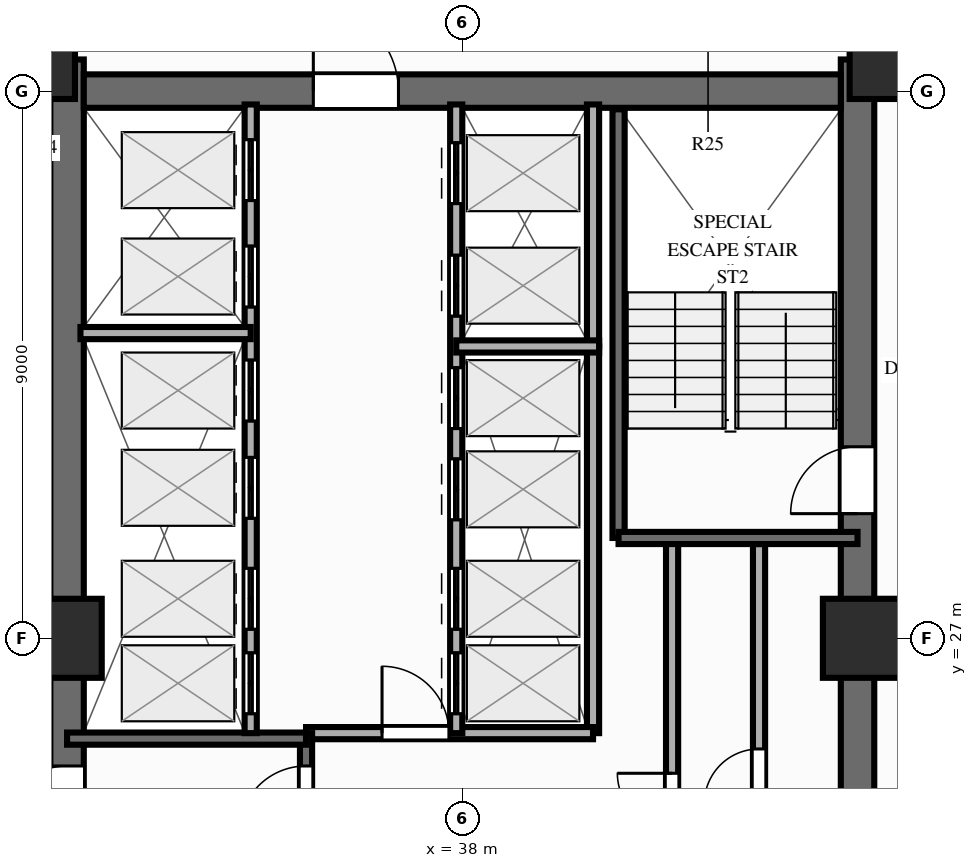
"""IFC4 building model, lengths in metres.
Left out: names, types, materials, properties, quantities, classifications, styles, units other than length and angle.
Written with IfcOpenShell. Run it as: python <this file> out.ifc"""

import sys

from ifc_helpers import new_model, si_unit, direction, frame, frame_2d, origin, origin_2d, place, context, subcontext, project, spatial, rectangle, extrude, source, transform, mapped, element, fill, save


model = new_model("IFC4")
c1 = context("Model", 3, precision=1e-05, world=origin(), true_north=direction((0.0, 1.0)))
c2 = subcontext(c1, "Body", "Model", "MODEL_VIEW")
j1 = project(units=[si_unit("LENGTHUNIT", "METRE"), si_unit("PLANEANGLEUNIT", "RADIAN")], contexts=[c1])
p1 = place(None, origin())
s1 = spatial("IfcSite", under=j1, at=p1, CompositionType="ELEMENT")
p2 = place(p1, origin())
s2 = spatial("IfcBuilding", under=s1, at=p2, CompositionType="ELEMENT")
p3 = place(p2, frame((0.0, 0.0, 89.85)))
s3 = spatial("IfcBuildingStorey", under=s2, at=p3, CompositionType="ELEMENT", Elevation=89.85)
p4 = place(p3, frame((31.5, 17.48, 0.0), z_axis=(0.0, 0.0, 1.0), x_axis=(0.0, 1.0, 0.0)))
e1 = element("IfcWall", 1, at=p4, inside=s3, PredefinedType="SHEAR", context=c2, shape_type="SweptSolid", body=[
    extrude(rectangle(XDim=19.04, YDim=0.55, at=frame_2d((9.52, 0.0))), origin(), (0.0, 0.0, 1.0), 3.0),
])
p5 = place(p4, frame((6.32, 0.0, 0.0)))
e2 = element("IfcOpeningElement", 2, at=p5, cuts=e1, PredefinedType="OPENING", context=c2, shape_type="SweptSolid", body=[
    extrude(rectangle(XDim=1.1, YDim=2.15, at=frame_2d((0.55, 1.075))), frame((0.0, 0.287, 0.0), z_axis=(0.0, -1.0, 0.0), x_axis=(1.0, 0.0, 0.0)), (0.0, 0.0, 1.0), 0.574),
])
p6 = place(p3, frame((44.5, 17.48, 0.0), z_axis=(0.0, 0.0, 1.0), x_axis=(0.0, 1.0, 0.0)))
e3 = element("IfcWall", 3, at=p6, inside=s3, PredefinedType="SHEAR", context=c2, shape_type="SweptSolid", body=[
    extrude(rectangle(XDim=19.04, YDim=0.55, at=frame_2d((9.52, 0.0))), origin(), (0.0, 0.0, 1.0), 3.0),
])
p7 = place(p6, frame((12.67, 0.0, 0.0), z_axis=(0.0, 0.0, 1.0), x_axis=(-1.0, 0.0, 0.0)))
e4 = element("IfcOpeningElement", 4, at=p7, cuts=e3, PredefinedType="OPENING", context=c2, shape_type="SweptSolid", body=[
    extrude(rectangle(XDim=1.1, YDim=2.15, at=frame_2d((0.55, 1.075))), frame((0.0, 0.287, 0.0), z_axis=(0.0, -1.0, 0.0), x_axis=(1.0, 0.0, 0.0)), (0.0, 0.0, 1.0), 0.574),
])
p8 = place(p3, frame((31.775, 36.0, 0.0), z_axis=(0.0, 0.0, 1.0), x_axis=(1.0, 0.0, 0.0)))
e5 = element("IfcWall", 5, at=p8, inside=s3, PredefinedType="SHEAR", context=c2, shape_type="SweptSolid", body=[
    extrude(rectangle(XDim=12.45, YDim=0.55, at=frame_2d((6.225, 0.0))), origin(), (0.0, 0.0, 1.0), 3.0),
])
p9 = place(p8, frame((5.175, 0.0, 0.0), z_axis=(0.0, 0.0, 1.0), x_axis=(-1.0, 0.0, 0.0)))
e6 = element("IfcOpeningElement", 6, at=p9, cuts=e5, PredefinedType="OPENING", context=c2, shape_type="SweptSolid", body=[
    extrude(rectangle(XDim=1.4, YDim=2.15, at=frame_2d((0.7, 1.075))), frame((0.0, 0.287, 0.0), z_axis=(0.0, -1.0, 0.0), x_axis=(1.0, 0.0, 0.0)), (0.0, 0.0, 1.0), 0.574),
])
m1 = source(origin(), c2, "Body", "SweptSolid", [
    extrude(rectangle(XDim=1.3, YDim=1.3, at=origin_2d()), origin(), (0.0, 0.0, 1.0), 3.0),
])
for number, where, z_axis, x_axis in (
    (7, (30.98, 36.52, 0.0), (0.0, 0.0, 1.0), (1.0, 0.0, 0.0)),
    (8, (45.02, 36.52, 0.0), (0.0, 0.0, 1.0), (1.0, 0.0, 0.0)),
    (9, (31.42, 27.0, 0.0), (0.0, 0.0, 1.0), (1.0, 0.0, 0.0)),
    (10, (44.58, 27.0, 0.0), (0.0, 0.0, 1.0), (1.0, 0.0, 0.0)),
):
    element("IfcColumn", number, at=place(p3, frame(where, z_axis=z_axis, x_axis=x_axis)), inside=s3, PredefinedType="COLUMN", context=c2, shape_type="MappedRepresentation", body=[
        mapped(m1, transform((0.0, 0.0, 0.0), scale=1.0)),
    ])
p10 = place(p3, frame((42.88, 21.08, 0.0), z_axis=(0.0, 0.0, 1.0), x_axis=(0.0, 1.0, 0.0)))
e11 = element("IfcWall", 11, at=p10, inside=s3, PredefinedType="PARTITIONING", context=c2, shape_type="SweptSolid", body=[
    extrude(rectangle(XDim=7.47, YDim=0.2, at=frame_2d((3.735, 0.0))), origin(), (0.0, 0.0, 1.0), 2.79),
])
p11 = place(p10, frame((3.2, 0.0, 0.0)))
e12 = element("IfcOpeningElement", 12, at=p11, cuts=e11, PredefinedType="OPENING", context=c2, shape_type="SweptSolid", body=[
    extrude(rectangle(XDim=0.9, YDim=2.1, at=frame_2d((0.45, 1.05))), frame((0.0, 0.112, 0.0), z_axis=(0.0, -1.0, 0.0), x_axis=(1.0, 0.0, 0.0)), (0.0, 0.0, 1.0), 0.224),
])
p12 = place(p3, frame((41.45, 21.08, 0.0), z_axis=(0.0, 0.0, 1.0), x_axis=(0.0, 1.0, 0.0)))
e13 = element("IfcWall", 13, at=p12, inside=s3, PredefinedType="PARTITIONING", context=c2, shape_type="SweptSolid", body=[
    extrude(rectangle(XDim=7.52, YDim=0.2, at=frame_2d((3.76, 0.0))), origin(), (0.0, 0.0, 1.0), 2.79),
])
p13 = place(p12, frame((2.8, 0.0, 0.0)))
e14 = element("IfcOpeningElement", 14, at=p13, cuts=e13, PredefinedType="OPENING", context=c2, shape_type="SweptSolid", body=[
    extrude(rectangle(XDim=0.9, YDim=2.1, at=frame_2d((0.45, 1.05))), frame((0.0, 0.112, 0.0), z_axis=(0.0, -1.0, 0.0), x_axis=(1.0, 0.0, 0.0)), (0.0, 0.0, 1.0), 0.224),
])
p14 = place(p3, frame((40.15, 25.44, 0.0), z_axis=(0.0, 0.0, 1.0), x_axis=(0.0, 1.0, 0.0)))
e15 = element("IfcWall", 15, at=p14, inside=s3, PredefinedType="PARTITIONING", context=c2, shape_type="SweptSolid", body=[
    extrude(rectangle(XDim=6.36, YDim=0.2, at=frame_2d((3.18, 0.0))), origin(), (0.0, 0.0, 1.0), 2.79),
])
p15 = place(p3, frame((40.15, 31.8, 0.0), z_axis=(0.0, 0.0, 1.0), x_axis=(0.0, 1.0, 0.0)))
e16 = element("IfcWall", 16, at=p15, inside=s3, PredefinedType="PARTITIONING", context=c2, shape_type="SweptSolid", body=[
    extrude(rectangle(XDim=3.98, YDim=0.2, at=frame_2d((1.99, 0.0))), origin(), (0.0, 0.0, 1.0), 2.79),
])
p16 = place(p3, frame((35.43, 25.44, 0.0), z_axis=(0.0, 0.0, 1.0), x_axis=(1.0, 0.0, 0.0)))
e17 = element("IfcWall", 17, at=p16, inside=s3, PredefinedType="PARTITIONING", context=c2, shape_type="SweptSolid", body=[
    extrude(rectangle(XDim=4.72, YDim=0.2, at=frame_2d((2.36, 0.0))), origin(), (0.0, 0.0, 1.0), 2.79),
])
p17 = place(p16, frame((1.25, 0.0, 0.0)))
e18 = element("IfcOpeningElement", 18, at=p17, cuts=e17, PredefinedType="OPENING", context=c2, shape_type="SweptSolid", body=[
    extrude(rectangle(XDim=1.1, YDim=2.15, at=frame_2d((0.55, 1.075))), frame((0.0, 0.112, 0.0), z_axis=(0.0, -1.0, 0.0), x_axis=(1.0, 0.0, 0.0)), (0.0, 0.0, 1.0), 0.224),
])
p18 = place(p3, frame((35.43, 18.22, 0.0), z_axis=(0.0, 0.0, 1.0), x_axis=(0.0, 1.0, 0.0)))
e19 = element("IfcWall", 19, at=p18, inside=s3, PredefinedType="SOLIDWALL", context=c2, shape_type="SweptSolid", body=[
    extrude(rectangle(XDim=7.22, YDim=0.2, at=frame_2d((3.61, 0.0))), origin(), (0.0, 0.0, 1.0), 2.79),
])
p19 = place(p18, frame((6.68, 0.0, 0.0), z_axis=(0.0, 0.0, 1.0), x_axis=(-1.0, 0.0, 0.0)))
e20 = element("IfcOpeningElement", 20, at=p19, cuts=e19, PredefinedType="OPENING", context=c2, shape_type="SweptSolid", body=[
    extrude(rectangle(XDim=1.1, YDim=2.15, at=frame_2d((0.55, 1.075))), frame((0.0, 0.112, 0.0), z_axis=(0.0, -1.0, 0.0), x_axis=(1.0, 0.0, 0.0)), (0.0, 0.0, 1.0), 0.224),
])
p20 = place(p3, frame((31.5, 25.35, 0.0), z_axis=(0.0, 0.0, 1.0), x_axis=(1.0, 0.0, 0.0)))
e21 = element("IfcWall", 21, at=p20, inside=s3, PredefinedType="SOLIDWALL", context=c2, shape_type="SweptSolid", body=[
    extrude(rectangle(XDim=3.93, YDim=0.2, at=frame_2d((1.965, 0.0))), origin(), (0.0, 0.0, 1.0), 2.79),
])
p21 = place(p3, frame((40.57, 28.65, 0.0), z_axis=(0.0, 0.0, 1.0), x_axis=(0.0, 1.0, 0.0)))
e22 = element("IfcWall", 22, at=p21, inside=s3, PredefinedType="SOLIDWALL", context=c2, shape_type="SweptSolid", body=[
    extrude(rectangle(XDim=7.05, YDim=0.2, at=frame_2d((3.525, 0.0))), origin(), (0.0, 0.0, 1.0), 2.79),
])
p22 = place(p3, frame((40.57, 28.65, 0.0), z_axis=(0.0, 0.0, 1.0), x_axis=(1.0, 0.0, 0.0)))
e23 = element("IfcWall", 23, at=p22, inside=s3, PredefinedType="SOLIDWALL", context=c2, shape_type="SweptSolid", body=[
    extrude(rectangle(XDim=3.93, YDim=0.2, at=frame_2d((1.965, 0.0))), origin(), (0.0, 0.0, 1.0), 2.79),
])
p23 = place(p3, frame((34.52, 25.44, 0.0), z_axis=(0.0, 0.0, 1.0), x_axis=(0.0, 1.0, 0.0)))
e24 = element("IfcWall", 24, at=p23, inside=s3, PredefinedType="PARTITIONING", context=c2, shape_type="SweptSolid", body=[
    extrude(rectangle(XDim=10.34, YDim=0.2, at=frame_2d((5.17, 0.0))), origin(), (0.0, 0.0, 1.0), 2.79),
])
p24 = place(p23, frame((0.32, 0.0, 0.0)))
e25 = element("IfcOpeningElement", 25, at=p24, cuts=e24, PredefinedType="OPENING", context=c2, shape_type="SweptSolid", body=[
    extrude(rectangle(XDim=1.0, YDim=2.15, at=frame_2d((0.5, 1.075))), frame((0.0, 0.112, 0.0), z_axis=(0.0, -1.0, 0.0), x_axis=(1.0, 0.0, 0.0)), (0.0, 0.0, 1.0), 0.224),
])
p25 = place(p23, frame((1.71, 0.0, 0.0)))
e26 = element("IfcOpeningElement", 26, at=p25, cuts=e24, PredefinedType="OPENING", context=c2, shape_type="SweptSolid", body=[
    extrude(rectangle(XDim=1.0, YDim=2.15, at=frame_2d((0.5, 1.075))), frame((0.0, 0.112, 0.0), z_axis=(0.0, -1.0, 0.0), x_axis=(1.0, 0.0, 0.0)), (0.0, 0.0, 1.0), 0.224),
])
p26 = place(p23, frame((3.535, 0.0, 0.0)))
e27 = element("IfcOpeningElement", 27, at=p26, cuts=e24, PredefinedType="OPENING", context=c2, shape_type="SweptSolid", body=[
    extrude(rectangle(XDim=1.0, YDim=2.15, at=frame_2d((0.5, 1.075))), frame((0.0, 0.112, 0.0), z_axis=(0.0, -1.0, 0.0), x_axis=(1.0, 0.0, 0.0)), (0.0, 0.0, 1.0), 0.224),
])
p27 = place(p23, frame((5.135, 0.0, 0.0)))
e28 = element("IfcOpeningElement", 28, at=p27, cuts=e24, PredefinedType="OPENING", context=c2, shape_type="SweptSolid", body=[
    extrude(rectangle(XDim=1.0, YDim=2.15, at=frame_2d((0.5, 1.075))), frame((0.0, 0.112, 0.0), z_axis=(0.0, -1.0, 0.0), x_axis=(1.0, 0.0, 0.0)), (0.0, 0.0, 1.0), 0.224),
])
p28 = place(p23, frame((7.01, 0.0, 0.0)))
e29 = element("IfcOpeningElement", 29, at=p28, cuts=e24, PredefinedType="OPENING", context=c2, shape_type="SweptSolid", body=[
    extrude(rectangle(XDim=1.0, YDim=2.15, at=frame_2d((0.5, 1.075))), frame((0.0, 0.112, 0.0), z_axis=(0.0, -1.0, 0.0), x_axis=(1.0, 0.0, 0.0)), (0.0, 0.0, 1.0), 0.224),
])
p29 = place(p23, frame((8.76, 0.0, 0.0)))
e30 = element("IfcOpeningElement", 30, at=p29, cuts=e24, PredefinedType="OPENING", context=c2, shape_type="SweptSolid", body=[
    extrude(rectangle(XDim=1.0, YDim=2.15, at=frame_2d((0.5, 1.075))), frame((0.0, 0.112, 0.0), z_axis=(0.0, -1.0, 0.0), x_axis=(1.0, 0.0, 0.0)), (0.0, 0.0, 1.0), 0.224),
])
p30 = place(p3, frame((31.72, 32.02, 0.0), z_axis=(0.0, 0.0, 1.0), x_axis=(1.0, 0.0, 0.0)))
e31 = element("IfcWall", 31, at=p30, inside=s3, PredefinedType="PARTITIONING", context=c2, shape_type="SweptSolid", body=[
    extrude(rectangle(XDim=2.8, YDim=0.2, at=frame_2d((1.4, 0.0))), origin(), (0.0, 0.0, 1.0), 2.79),
])
p31 = place(p3, frame((37.9, 25.44, 0.0), z_axis=(0.0, 0.0, 1.0), x_axis=(0.0, 1.0, 0.0)))
e32 = element("IfcWall", 32, at=p31, inside=s3, PredefinedType="PARTITIONING", context=c2, shape_type="SweptSolid", body=[
    extrude(rectangle(XDim=10.34, YDim=0.2, at=frame_2d((5.17, 0.0))), origin(), (0.0, 0.0, 1.0), 2.79),
])
p32 = place(p31, frame((0.32, 0.0, 0.0)))
e33 = element("IfcOpeningElement", 33, at=p32, cuts=e32, PredefinedType="OPENING", context=c2, shape_type="SweptSolid", body=[
    extrude(rectangle(XDim=1.0, YDim=2.15, at=frame_2d((0.5, 1.075))), frame((0.0, 0.112, 0.0), z_axis=(0.0, -1.0, 0.0), x_axis=(1.0, 0.0, 0.0)), (0.0, 0.0, 1.0), 0.224),
])
p33 = place(p31, frame((1.71, 0.0, 0.0)))
e34 = element("IfcOpeningElement", 34, at=p33, cuts=e32, PredefinedType="OPENING", context=c2, shape_type="SweptSolid", body=[
    extrude(rectangle(XDim=1.0, YDim=2.15, at=frame_2d((0.5, 1.075))), frame((0.0, 0.112, 0.0), z_axis=(0.0, -1.0, 0.0), x_axis=(1.0, 0.0, 0.0)), (0.0, 0.0, 1.0), 0.224),
])
p34 = place(p31, frame((3.51, 0.0, 0.0)))
e35 = element("IfcOpeningElement", 35, at=p34, cuts=e32, PredefinedType="OPENING", context=c2, shape_type="SweptSolid", body=[
    extrude(rectangle(XDim=1.0, YDim=2.15, at=frame_2d((0.5, 1.075))), frame((0.0, 0.112, 0.0), z_axis=(0.0, -1.0, 0.0), x_axis=(1.0, 0.0, 0.0)), (0.0, 0.0, 1.0), 0.224),
])
p35 = place(p31, frame((5.01, 0.0, 0.0)))
e36 = element("IfcOpeningElement", 36, at=p35, cuts=e32, PredefinedType="OPENING", context=c2, shape_type="SweptSolid", body=[
    extrude(rectangle(XDim=1.0, YDim=2.15, at=frame_2d((0.5, 1.075))), frame((0.0, 0.112, 0.0), z_axis=(0.0, -1.0, 0.0), x_axis=(1.0, 0.0, 0.0)), (0.0, 0.0, 1.0), 0.224),
])
p36 = place(p31, frame((6.86, 0.0, 0.0)))
e37 = element("IfcOpeningElement", 37, at=p36, cuts=e32, PredefinedType="OPENING", context=c2, shape_type="SweptSolid", body=[
    extrude(rectangle(XDim=1.0, YDim=2.15, at=frame_2d((0.5, 1.075))), frame((0.0, 0.112, 0.0), z_axis=(0.0, -1.0, 0.0), x_axis=(1.0, 0.0, 0.0)), (0.0, 0.0, 1.0), 0.224),
])
p37 = place(p31, frame((8.71, 0.0, 0.0)))
e38 = element("IfcOpeningElement", 38, at=p37, cuts=e32, PredefinedType="OPENING", context=c2, shape_type="SweptSolid", body=[
    extrude(rectangle(XDim=1.0, YDim=2.15, at=frame_2d((0.5, 1.075))), frame((0.0, 0.112, 0.0), z_axis=(0.0, -1.0, 0.0), x_axis=(1.0, 0.0, 0.0)), (0.0, 0.0, 1.0), 0.224),
])
p38 = place(p3, frame((37.9, 31.8, 0.0), z_axis=(0.0, 0.0, 1.0), x_axis=(1.0, 0.0, 0.0)))
e39 = element("IfcWall", 39, at=p38, inside=s3, PredefinedType="PARTITIONING", context=c2, shape_type="SweptSolid", body=[
    extrude(rectangle(XDim=2.35, YDim=0.2, at=frame_2d((1.175, 0.0))), origin(), (0.0, 0.0, 1.0), 2.79),
])
m2 = source(origin(), c2, "Body", "SweptSolid", [
    extrude(rectangle(XDim=1.1, YDim=2.15, at=frame_2d((0.55, 1.075))), frame((0.0, 0.025, 0.0), z_axis=(0.0, -1.0, 0.0), x_axis=(1.0, 0.0, 0.0)), (0.0, 0.0, 1.0), 0.05),
])
p39 = place(p5, origin())
e40 = element("IfcDoor", 40, at=p39, inside=s3, OperationType="SINGLE_SWING_LEFT", PredefinedType="DOOR", context=c2, shape_type="MappedRepresentation", body=[
    mapped(m2, transform((0.0, 0.0, 0.0), scale=1.0)),
])
fill(e2, e40)
p40 = place(p7, origin())
e41 = element("IfcDoor", 41, at=p40, inside=s3, OperationType="SINGLE_SWING_RIGHT", PredefinedType="DOOR", context=c2, shape_type="MappedRepresentation", body=[
    mapped(m2, transform((0.0, 0.0, 0.0), scale=1.0)),
])
fill(e4, e41)
m3 = source(origin(), c2, "Body", "SweptSolid", [
    extrude(rectangle(XDim=1.4, YDim=2.15, at=frame_2d((0.7, 1.075))), frame((0.0, 0.025, 0.0), z_axis=(0.0, -1.0, 0.0), x_axis=(1.0, 0.0, 0.0)), (0.0, 0.0, 1.0), 0.05),
])
p41 = place(p9, origin())
e42 = element("IfcDoor", 42, at=p41, inside=s3, OperationType="SINGLE_SWING_RIGHT", PredefinedType="DOOR", context=c2, shape_type="MappedRepresentation", body=[
    mapped(m3, transform((0.0, 0.0, 0.0), scale=1.0)),
])
fill(e6, e42)
m4 = source(origin(), c2, "Body", "SweptSolid", [
    extrude(rectangle(XDim=0.9, YDim=2.1, at=frame_2d((0.45, 1.05))), frame((0.0, 0.025, 0.0), z_axis=(0.0, -1.0, 0.0), x_axis=(1.0, 0.0, 0.0)), (0.0, 0.0, 1.0), 0.05),
])
p42 = place(p11, origin())
e43 = element("IfcDoor", 43, at=p42, inside=s3, OperationType="SINGLE_SWING_LEFT", PredefinedType="DOOR", context=c2, shape_type="MappedRepresentation", body=[
    mapped(m4, transform((0.0, 0.0, 0.0), scale=1.0)),
])
fill(e12, e43)
p43 = place(p13, origin())
e44 = element("IfcDoor", 44, at=p43, inside=s3, OperationType="SINGLE_SWING_RIGHT", PredefinedType="DOOR", context=c2, shape_type="MappedRepresentation", body=[
    mapped(m4, transform((0.0, 0.0, 0.0), scale=1.0)),
])
fill(e14, e44)
p44 = place(p17, origin())
e45 = element("IfcDoor", 45, at=p44, inside=s3, OperationType="SINGLE_SWING_LEFT", PredefinedType="DOOR", context=c2, shape_type="MappedRepresentation", body=[
    mapped(m2, transform((0.0, 0.0, 0.0), scale=1.0)),
])
fill(e18, e45)
p45 = place(p19, origin())
e46 = element("IfcDoor", 46, at=p45, inside=s3, OperationType="SINGLE_SWING_RIGHT", PredefinedType="DOOR", context=c2, shape_type="MappedRepresentation", body=[
    mapped(m2, transform((0.0, 0.0, 0.0), scale=1.0)),
])
fill(e20, e46)
m5 = source(origin(), c2, "Body", "SweptSolid", [
    extrude(rectangle(XDim=1.0, YDim=2.15, at=frame_2d((0.5, 1.075))), frame((0.0, 0.025, 0.0), z_axis=(0.0, -1.0, 0.0), x_axis=(1.0, 0.0, 0.0)), (0.0, 0.0, 1.0), 0.05),
])
p46 = place(p24, origin())
e47 = element("IfcDoor", 47, at=p46, inside=s3, OperationType="DOUBLE_DOOR_SLIDING", PredefinedType="DOOR", context=c2, shape_type="MappedRepresentation", body=[
    mapped(m5, transform((0.0, 0.0, 0.0), scale=1.0)),
])
fill(e25, e47)
p47 = place(p25, origin())
e48 = element("IfcDoor", 48, at=p47, inside=s3, OperationType="DOUBLE_DOOR_SLIDING", PredefinedType="DOOR", context=c2, shape_type="MappedRepresentation", body=[
    mapped(m5, transform((0.0, 0.0, 0.0), scale=1.0)),
])
fill(e26, e48)
p48 = place(p26, origin())
e49 = element("IfcDoor", 49, at=p48, inside=s3, OperationType="DOUBLE_DOOR_SLIDING", PredefinedType="DOOR", context=c2, shape_type="MappedRepresentation", body=[
    mapped(m5, transform((0.0, 0.0, 0.0), scale=1.0)),
])
fill(e27, e49)
p49 = place(p27, origin())
e50 = element("IfcDoor", 50, at=p49, inside=s3, OperationType="DOUBLE_DOOR_SLIDING", PredefinedType="DOOR", context=c2, shape_type="MappedRepresentation", body=[
    mapped(m5, transform((0.0, 0.0, 0.0), scale=1.0)),
])
fill(e28, e50)
p50 = place(p28, origin())
e51 = element("IfcDoor", 51, at=p50, inside=s3, OperationType="DOUBLE_DOOR_SLIDING", PredefinedType="DOOR", context=c2, shape_type="MappedRepresentation", body=[
    mapped(m5, transform((0.0, 0.0, 0.0), scale=1.0)),
])
fill(e29, e51)
p51 = place(p29, origin())
e52 = element("IfcDoor", 52, at=p51, inside=s3, OperationType="DOUBLE_DOOR_SLIDING", PredefinedType="DOOR", context=c2, shape_type="MappedRepresentation", body=[
    mapped(m5, transform((0.0, 0.0, 0.0), scale=1.0)),
])
fill(e30, e52)
p52 = place(p32, origin())
e53 = element("IfcDoor", 53, at=p52, inside=s3, OperationType="DOUBLE_DOOR_SLIDING", PredefinedType="DOOR", context=c2, shape_type="MappedRepresentation", body=[
    mapped(m5, transform((0.0, 0.0, 0.0), scale=1.0)),
])
fill(e33, e53)
p53 = place(p33, origin())
e54 = element("IfcDoor", 54, at=p53, inside=s3, OperationType="DOUBLE_DOOR_SLIDING", PredefinedType="DOOR", context=c2, shape_type="MappedRepresentation", body=[
    mapped(m5, transform((0.0, 0.0, 0.0), scale=1.0)),
])
fill(e34, e54)
p54 = place(p34, origin())
e55 = element("IfcDoor", 55, at=p54, inside=s3, OperationType="DOUBLE_DOOR_SLIDING", PredefinedType="DOOR", context=c2, shape_type="MappedRepresentation", body=[
    mapped(m5, transform((0.0, 0.0, 0.0), scale=1.0)),
])
fill(e35, e55)
p55 = place(p35, origin())
e56 = element("IfcDoor", 56, at=p55, inside=s3, OperationType="DOUBLE_DOOR_SLIDING", PredefinedType="DOOR", context=c2, shape_type="MappedRepresentation", body=[
    mapped(m5, transform((0.0, 0.0, 0.0), scale=1.0)),
])
fill(e36, e56)
p56 = place(p36, origin())
e57 = element("IfcDoor", 57, at=p56, inside=s3, OperationType="DOUBLE_DOOR_SLIDING", PredefinedType="DOOR", context=c2, shape_type="MappedRepresentation", body=[
    mapped(m5, transform((0.0, 0.0, 0.0), scale=1.0)),
])
fill(e37, e57)
p57 = place(p37, origin())
e58 = element("IfcDoor", 58, at=p57, inside=s3, OperationType="DOUBLE_DOOR_SLIDING", PredefinedType="DOOR", context=c2, shape_type="MappedRepresentation", body=[
    mapped(m5, transform((0.0, 0.0, 0.0), scale=1.0)),
])
fill(e38, e58)
save(model, sys.argv[1])
